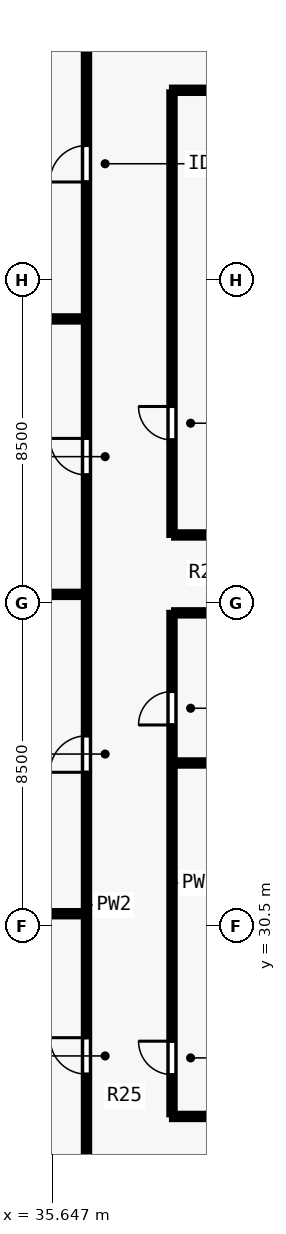
"""IFC4 building model, lengths in metres.
Left out: names, types, materials, properties, quantities, classifications, styles, units other than length and angle.
Written with IfcOpenShell. Run it as: python <this file> out.ifc"""

import sys

from ifc_helpers import new_model, si_unit, direction, frame, frame_2d, origin, place, context, subcontext, project, spatial, rectangle, extrude, element, fill, save


model = new_model("IFC4")
c1 = context("Model", 3, precision=1e-05, world=origin(), true_north=direction((0.0, 1.0)))
c2 = subcontext(c1, "Body", "Model", "MODEL_VIEW")
j1 = project(units=[si_unit("LENGTHUNIT", "METRE"), si_unit("PLANEANGLEUNIT", "RADIAN")], contexts=[c1])
p1 = place(None, origin())
s1 = spatial("IfcSite", under=j1, at=p1, CompositionType="ELEMENT")
p2 = place(p1, origin())
s2 = spatial("IfcBuilding", under=s1, at=p2, CompositionType="ELEMENT")
p3 = place(p2, frame((0.0, 0.0, 44.5)))
s3 = spatial("IfcBuildingStorey", under=s2, at=p3, CompositionType="ELEMENT", Elevation=44.5)
p4 = place(p3, frame((36.55, 23.305, 0.0), z_axis=(0.0, 0.0, 1.0), x_axis=(0.0, 1.0, 0.0)))
e1 = element("IfcWall", 1, at=p4, inside=s3, PredefinedType="PARTITIONING", context=c2, shape_type="SweptSolid", body=[
    extrude(rectangle(XDim=31.39, YDim=0.14, at=frame_2d((15.695, 0.0))), origin(), (0.0, 0.0, 1.0), 3.28),
])
p5 = place(p4, frame((3.307, 0.0, 0.0)))
e2 = element("IfcOpeningElement", 2, at=p5, cuts=e1, PredefinedType="OPENING", context=c2, shape_type="SweptSolid", body=[
    extrude(rectangle(XDim=0.96, YDim=2.12, at=frame_2d((0.48, 1.06))), frame((0.0, 0.08, 0.0), z_axis=(0.0, -1.0, 0.0), x_axis=(1.0, 0.0, 0.0)), (0.0, 0.0, 1.0), 0.16),
])
p6 = place(p4, frame((11.25, 0.0, 0.0)))
e3 = element("IfcOpeningElement", 3, at=p6, cuts=e1, PredefinedType="OPENING", context=c2, shape_type="SweptSolid", body=[
    extrude(rectangle(XDim=0.96, YDim=2.12, at=frame_2d((0.48, 1.06))), frame((0.0, 0.08, 0.0), z_axis=(0.0, -1.0, 0.0), x_axis=(1.0, 0.0, 0.0)), (0.0, 0.0, 1.0), 0.16),
])
p7 = place(p4, frame((19.075, 0.0, 0.0)))
e4 = element("IfcOpeningElement", 4, at=p7, cuts=e1, PredefinedType="OPENING", context=c2, shape_type="SweptSolid", body=[
    extrude(rectangle(XDim=0.96, YDim=2.12, at=frame_2d((0.48, 1.06))), frame((0.0, 0.08, 0.0), z_axis=(0.0, -1.0, 0.0), x_axis=(1.0, 0.0, 0.0)), (0.0, 0.0, 1.0), 0.16),
])
p8 = place(p4, frame((26.782, 0.0, 0.0)))
e5 = element("IfcOpeningElement", 5, at=p8, cuts=e1, PredefinedType="OPENING", context=c2, shape_type="SweptSolid", body=[
    extrude(rectangle(XDim=0.96, YDim=2.12, at=frame_2d((0.48, 1.06))), frame((0.0, 0.08, 0.0), z_axis=(0.0, -1.0, 0.0), x_axis=(1.0, 0.0, 0.0)), (0.0, 0.0, 1.0), 0.16),
])
p9 = place(p3, frame((38.8, 25.5, 0.0), z_axis=(0.0, 0.0, 1.0), x_axis=(1.0, 0.0, 0.0)))
e6 = element("IfcWall", 6, at=p9, inside=s3, PredefinedType="PARTITIONING", context=c2, shape_type="SweptSolid", body=[
    extrude(rectangle(XDim=26.4, YDim=0.14, at=frame_2d((13.2, 0.0))), origin(), (0.0, 0.0, 1.0), 3.28),
])
p10 = place(p9, frame((1.2, 0.0, 0.0)))
e7 = element("IfcOpeningElement", 7, at=p10, cuts=e6, PredefinedType="OPENING", context=c2, shape_type="SweptSolid", body=[
    extrude(rectangle(XDim=0.88, YDim=2.1, at=frame_2d((0.44, 1.05))), frame((0.0, 0.08, 0.0), z_axis=(0.0, -1.0, 0.0), x_axis=(1.0, 0.0, 0.0)), (0.0, 0.0, 1.0), 0.16),
])
p11 = place(p9, frame((9.7, 0.0, 0.0)))
e8 = element("IfcOpeningElement", 8, at=p11, cuts=e6, PredefinedType="OPENING", context=c2, shape_type="SweptSolid", body=[
    extrude(rectangle(XDim=0.88, YDim=2.1, at=frame_2d((0.44, 1.05))), frame((0.0, 0.08, 0.0), z_axis=(0.0, -1.0, 0.0), x_axis=(1.0, 0.0, 0.0)), (0.0, 0.0, 1.0), 0.16),
])
p12 = place(p9, frame((20.2, 0.0, 0.0)))
e9 = element("IfcOpeningElement", 9, at=p12, cuts=e6, PredefinedType="OPENING", context=c2, shape_type="SweptSolid", body=[
    extrude(rectangle(XDim=0.88, YDim=2.1, at=frame_2d((0.44, 1.05))), frame((0.0, 0.08, 0.0), z_axis=(0.0, -1.0, 0.0), x_axis=(1.0, 0.0, 0.0)), (0.0, 0.0, 1.0), 0.16),
])
p13 = place(p3, frame((38.8, 52.5, 0.0), z_axis=(0.0, 0.0, 1.0), x_axis=(1.0, 0.0, 0.0)))
e10 = element("IfcWall", 10, at=p13, inside=s3, PredefinedType="PARTITIONING", context=c2, shape_type="SweptSolid", body=[
    extrude(rectangle(XDim=26.4, YDim=0.14, at=frame_2d((13.2, 0.0))), origin(), (0.0, 0.0, 1.0), 3.28),
])
p14 = place(p13, frame((2.2, 0.0, 0.0)))
e11 = element("IfcOpeningElement", 11, at=p14, cuts=e10, PredefinedType="OPENING", context=c2, shape_type="SweptSolid", body=[
    extrude(rectangle(XDim=0.88, YDim=2.1, at=frame_2d((0.44, 1.05))), frame((0.0, 0.08, 0.0), z_axis=(0.0, -1.0, 0.0), x_axis=(1.0, 0.0, 0.0)), (0.0, 0.0, 1.0), 0.16),
])
p15 = place(p13, frame((13.7, 0.0, 0.0)))
e12 = element("IfcOpeningElement", 12, at=p15, cuts=e10, PredefinedType="OPENING", context=c2, shape_type="SweptSolid", body=[
    extrude(rectangle(XDim=0.88, YDim=2.1, at=frame_2d((0.44, 1.05))), frame((0.0, 0.08, 0.0), z_axis=(0.0, -1.0, 0.0), x_axis=(1.0, 0.0, 0.0)), (0.0, 0.0, 1.0), 0.16),
])
p16 = place(p13, frame((23.2, 0.0, 0.0)))
e13 = element("IfcOpeningElement", 13, at=p16, cuts=e10, PredefinedType="OPENING", context=c2, shape_type="SweptSolid", body=[
    extrude(rectangle(XDim=0.88, YDim=2.1, at=frame_2d((0.44, 1.05))), frame((0.0, 0.08, 0.0), z_axis=(0.0, -1.0, 0.0), x_axis=(1.0, 0.0, 0.0)), (0.0, 0.0, 1.0), 0.16),
])
p17 = place(p3, frame((38.8, 25.555, 0.0), z_axis=(0.0, 0.0, 1.0), x_axis=(0.0, 1.0, 0.0)))
e14 = element("IfcWall", 14, at=p17, inside=s3, PredefinedType="PARTITIONING", context=c2, shape_type="SweptSolid", body=[
    extrude(rectangle(XDim=13.195, YDim=0.14, at=frame_2d((6.598, 0.0))), origin(), (0.0, 0.0, 1.0), 3.28),
])
p18 = place(p17, frame((1.045, 0.0, 0.0)))
e15 = element("IfcOpeningElement", 15, at=p18, cuts=e14, PredefinedType="OPENING", context=c2, shape_type="SweptSolid", body=[
    extrude(rectangle(XDim=0.88, YDim=2.1, at=frame_2d((0.44, 1.05))), frame((0.0, 0.08, 0.0), z_axis=(0.0, -1.0, 0.0), x_axis=(1.0, 0.0, 0.0)), (0.0, 0.0, 1.0), 0.16),
])
p19 = place(p17, frame((10.245, 0.0, 0.0)))
e16 = element("IfcOpeningElement", 16, at=p19, cuts=e14, PredefinedType="OPENING", context=c2, shape_type="SweptSolid", body=[
    extrude(rectangle(XDim=0.88, YDim=2.1, at=frame_2d((0.44, 1.05))), frame((0.0, 0.08, 0.0), z_axis=(0.0, -1.0, 0.0), x_axis=(1.0, 0.0, 0.0)), (0.0, 0.0, 1.0), 0.16),
])
p20 = place(p3, frame((38.8, 40.8, 0.0), z_axis=(0.0, 0.0, 1.0), x_axis=(0.0, 1.0, 0.0)))
e17 = element("IfcWall", 17, at=p20, inside=s3, PredefinedType="PARTITIONING", context=c2, shape_type="SweptSolid", body=[
    extrude(rectangle(XDim=11.645, YDim=0.14, at=frame_2d((5.823, 0.0))), origin(), (0.0, 0.0, 1.0), 3.28),
])
p21 = place(p20, frame((2.5, 0.0, 0.0)))
e18 = element("IfcOpeningElement", 18, at=p21, cuts=e17, PredefinedType="OPENING", context=c2, shape_type="SweptSolid", body=[
    extrude(rectangle(XDim=0.88, YDim=2.1, at=frame_2d((0.44, 1.05))), frame((0.0, 0.08, 0.0), z_axis=(0.0, -1.0, 0.0), x_axis=(1.0, 0.0, 0.0)), (0.0, 0.0, 1.0), 0.16),
])
for number, where, z_axis, x_axis in (
    (19, (38.855, 38.75, 0.0), (0.0, 0.0, 1.0), (1.0, 0.0, 0.0)),
    (20, (38.855, 40.8, 0.0), (0.0, 0.0, 1.0), (1.0, 0.0, 0.0)),
    (21, (38.855, 34.8, 0.0), (0.0, 0.0, 1.0), (1.0, 0.0, 0.0)),
):
    element("IfcWall", number, at=place(p3, frame(where, z_axis=z_axis, x_axis=x_axis)), inside=s3, PredefinedType="PARTITIONING", context=c2, shape_type="SweptSolid", body=[
        extrude(rectangle(XDim=4.385, YDim=0.14, at=frame_2d((2.192, 0.0))), origin(), (0.0, 0.0, 1.0), 3.28),
    ])
p22 = place(p3, frame((26.92, 30.834, 0.0), z_axis=(0.0, 0.0, 1.0), x_axis=(1.0, 0.0, 0.0)))
e22 = element("IfcWall", 22, at=p22, inside=s3, PredefinedType="PARTITIONING", context=c2, shape_type="SweptSolid", body=[
    extrude(rectangle(XDim=9.53, YDim=0.14, at=frame_2d((4.765, 0.0))), origin(), (0.0, 0.0, 1.0), 3.28),
])
p23 = place(p3, frame((26.92, 39.236, 0.0), z_axis=(0.0, 0.0, 1.0), x_axis=(1.0, 0.0, 0.0)))
e23 = element("IfcWall", 23, at=p23, inside=s3, PredefinedType="PARTITIONING", context=c2, shape_type="SweptSolid", body=[
    extrude(rectangle(XDim=9.53, YDim=0.14, at=frame_2d((4.765, 0.0))), origin(), (0.0, 0.0, 1.0), 2.849),
])
p24 = place(p3, frame((26.92, 46.484, 0.0), z_axis=(0.0, 0.0, 1.0), x_axis=(1.0, 0.0, 0.0)))
e24 = element("IfcWall", 24, at=p24, inside=s3, PredefinedType="PARTITIONING", context=c2, shape_type="SweptSolid", body=[
    extrude(rectangle(XDim=9.53, YDim=0.14, at=frame_2d((4.765, 0.0))), origin(), (0.0, 0.0, 1.0), 3.28),
])
p25 = place(p18, origin())
e25 = element("IfcDoor", 25, at=p25, inside=s3, OperationType="SINGLE_SWING_RIGHT", PredefinedType="DOOR", context=c2, shape_type="SweptSolid", body=[
    extrude(rectangle(XDim=0.88, YDim=2.1, at=frame_2d((0.44, 1.05))), frame((0.0, 0.025, 0.0), z_axis=(0.0, -1.0, 0.0), x_axis=(1.0, 0.0, 0.0)), (0.0, 0.0, 1.0), 0.05),
])
fill(e15, e25)
p26 = place(p19, origin())
e26 = element("IfcDoor", 26, at=p26, inside=s3, OperationType="SINGLE_SWING_LEFT", PredefinedType="DOOR", context=c2, shape_type="SweptSolid", body=[
    extrude(rectangle(XDim=0.88, YDim=2.1, at=frame_2d((0.44, 1.05))), frame((0.0, 0.025, 0.0), z_axis=(0.0, -1.0, 0.0), x_axis=(1.0, 0.0, 0.0)), (0.0, 0.0, 1.0), 0.05),
])
fill(e16, e26)
p27 = place(p21, origin())
e27 = element("IfcDoor", 27, at=p27, inside=s3, OperationType="SINGLE_SWING_RIGHT", PredefinedType="DOOR", context=c2, shape_type="SweptSolid", body=[
    extrude(rectangle(XDim=0.88, YDim=2.1, at=frame_2d((0.44, 1.05))), frame((0.0, 0.025, 0.0), z_axis=(0.0, -1.0, 0.0), x_axis=(1.0, 0.0, 0.0)), (0.0, 0.0, 1.0), 0.05),
])
fill(e18, e27)
p28 = place(p5, origin())
e28 = element("IfcDoor", 28, at=p28, inside=s3, OperationType="SINGLE_SWING_RIGHT", PredefinedType="DOOR", context=c2, shape_type="SweptSolid", body=[
    extrude(rectangle(XDim=0.96, YDim=2.12, at=frame_2d((0.48, 1.06))), frame((0.0, 0.025, 0.0), z_axis=(0.0, -1.0, 0.0), x_axis=(1.0, 0.0, 0.0)), (0.0, 0.0, 1.0), 0.05),
])
fill(e2, e28)
p29 = place(p6, origin())
e29 = element("IfcDoor", 29, at=p29, inside=s3, OperationType="SINGLE_SWING_LEFT", PredefinedType="DOOR", context=c2, shape_type="SweptSolid", body=[
    extrude(rectangle(XDim=0.96, YDim=2.12, at=frame_2d((0.48, 1.06))), frame((0.0, 0.025, 0.0), z_axis=(0.0, -1.0, 0.0), x_axis=(1.0, 0.0, 0.0)), (0.0, 0.0, 1.0), 0.05),
])
fill(e3, e29)
p30 = place(p7, origin())
e30 = element("IfcDoor", 30, at=p30, inside=s3, OperationType="SINGLE_SWING_RIGHT", PredefinedType="DOOR", context=c2, shape_type="SweptSolid", body=[
    extrude(rectangle(XDim=0.96, YDim=2.12, at=frame_2d((0.48, 1.06))), frame((0.0, 0.025, 0.0), z_axis=(0.0, -1.0, 0.0), x_axis=(1.0, 0.0, 0.0)), (0.0, 0.0, 1.0), 0.05),
])
fill(e4, e30)
p31 = place(p8, origin())
e31 = element("IfcDoor", 31, at=p31, inside=s3, OperationType="SINGLE_SWING_LEFT", PredefinedType="DOOR", context=c2, shape_type="SweptSolid", body=[
    extrude(rectangle(XDim=0.96, YDim=2.12, at=frame_2d((0.48, 1.06))), frame((0.0, 0.025, 0.0), z_axis=(0.0, -1.0, 0.0), x_axis=(1.0, 0.0, 0.0)), (0.0, 0.0, 1.0), 0.05),
])
fill(e5, e31)
save(model, sys.argv[1])
